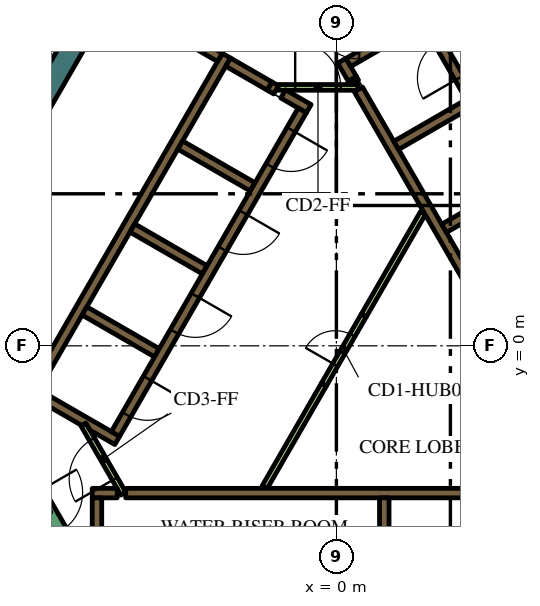
"""IFC4 building model, lengths in metres.
Left out: names, types, materials, properties, quantities, classifications, styles, units other than length and angle.
Written with IfcOpenShell. Run it as: python <this file> out.ifc"""

import sys

from ifc_helpers import new_model, si_unit, direction, frame, frame_2d, origin, place, context, subcontext, project, spatial, polyline, rectangle, outline, extrude, element, fill, save


model = new_model("IFC4")
c1 = context("Model", 3, precision=1e-05, world=origin(), true_north=direction((0.0, 1.0)))
c2 = subcontext(c1, "Body", "Model", "MODEL_VIEW")
j1 = project(units=[si_unit("LENGTHUNIT", "METRE"), si_unit("PLANEANGLEUNIT", "RADIAN")], contexts=[c1])
p1 = place(None, origin())
s1 = spatial("IfcSite", under=j1, at=p1, CompositionType="ELEMENT")
p2 = place(p1, origin())
s2 = spatial("IfcBuilding", under=s1, at=p2, CompositionType="ELEMENT")
p3 = place(p2, frame((0.0, 0.0, 317.4)))
s3 = spatial("IfcBuildingStorey", under=s2, at=p3, CompositionType="ELEMENT", Elevation=317.4)
p4 = place(p3, frame((1.989, 16.456, 0.0), z_axis=(0.0, 0.0, 1.0), x_axis=(0.49999102663, -0.8660305845, 0.0)))
e1 = element("IfcWall", 1, at=p4, inside=s3, PredefinedType="SOLIDWALL", context=c2, shape_type="SweptSolid", body=[
    extrude(rectangle(XDim=12.406, YDim=0.6, at=frame_2d((6.203, 0.0))), origin(), (0.0, 0.0, 1.0), 4.2),
])
p5 = place(p3, frame((-12.582, -1.892, 0.0), z_axis=(0.0, 0.0, 1.0), x_axis=(0.500003640647, 0.866023301845, 0.0)))
e2 = element("IfcWall", 2, at=p5, inside=s3, PredefinedType="SOLIDWALL", context=c2, shape_type="SweptSolid", body=[
    extrude(rectangle(XDim=15.858, YDim=0.6, at=frame_2d((7.929, 0.0))), origin(), (0.0, 0.0, 1.0), 4.2),
])
p6 = place(p3, frame((-5.545, -3.875, 0.0), z_axis=(0.0, 0.0, 1.0), x_axis=(1.0, 0.0, 0.0)))
e3 = element("IfcWall", 3, at=p6, inside=s3, PredefinedType="SOLIDWALL", context=c2, shape_type="SweptSolid", body=[
    extrude(rectangle(XDim=11.97, YDim=0.25, at=frame_2d((5.985, 0.0))), origin(), (0.0, 0.0, 1.0), 4.2),
])
p7 = place(p3, frame((-6.425, -3.875, 0.0), z_axis=(0.0, 0.0, 1.0), x_axis=(1.0, 0.0, 0.0)))
e4 = element("IfcWall", 4, at=p7, inside=s3, PredefinedType="SOLIDWALL", context=c2, shape_type="SweptSolid", body=[
    extrude(rectangle(XDim=0.658, YDim=0.25, at=frame_2d((0.329, 0.0))), origin(), (0.0, 0.0, 1.0), 4.2),
])
p8 = place(p3, frame((1.26, -4.0, 0.0), z_axis=(0.0, 0.0, 1.0), x_axis=(0.0, -1.0, 0.0)))
e5 = element("IfcWall", 5, at=p8, inside=s3, PredefinedType="SOLIDWALL", context=c2, shape_type="SweptSolid", body=[
    extrude(rectangle(XDim=2.2, YDim=0.25, at=frame_2d((1.1, 0.0))), origin(), (0.0, 0.0, 1.0), 4.2),
])
p9 = place(p3, frame((-6.3, -7.125, 0.0), z_axis=(0.0, 0.0, 1.0), x_axis=(0.0, 1.0, 0.0)))
e6 = element("IfcWall", 6, at=p9, inside=s3, PredefinedType="SOLIDWALL", context=c2, shape_type="SweptSolid", body=[
    extrude(rectangle(XDim=3.125, YDim=0.25, at=frame_2d((1.562, 0.0))), origin(), (0.0, 0.0, 1.0), 4.2),
])
p10 = place(p3, frame((0.473, 6.93, 0.0), z_axis=(0.0, 0.0, 1.0), x_axis=(-0.49972245349, 0.866185586049, 0.0)))
e7 = element("IfcWall", 7, at=p10, inside=s3, PredefinedType="SOLIDWALL", context=c2, shape_type="SweptSolid", body=[
    extrude(rectangle(XDim=0.11, YDim=0.25, at=frame_2d((0.055, 0.0))), origin(), (0.0, 0.0, 1.0), 4.2),
])
p11 = place(p3, frame((6.568, -3.627, 0.0), z_axis=(0.0, 0.0, 1.0), x_axis=(-0.499999455981, 0.866025717874, 0.0)))
e8 = element("IfcWall", 8, at=p11, inside=s3, PredefinedType="SOLIDWALL", context=c2, shape_type="SweptSolid", body=[
    extrude(rectangle(XDim=11.978, YDim=0.25, at=frame_2d((5.989, 0.0))), origin(), (0.0, 0.0, 1.0), 4.2),
])
p12 = place(p3, frame((0.417, 7.027, 0.0), z_axis=(0.0, 0.0, 1.0), x_axis=(-0.500210807569, 0.865903659763, 0.0)))
e9 = element("IfcWall", 9, at=p12, inside=s3, PredefinedType="SOLIDWALL", context=c2, shape_type="SweptSolid", body=[
    extrude(rectangle(XDim=0.548, YDim=0.25, at=frame_2d((0.274, 0.0))), origin(), (0.0, 0.0, 1.0), 4.2),
])
p13 = place(p3, frame((3.1, 9.064, 0.0), z_axis=(0.0, 0.0, 1.0), x_axis=(-0.866030133475, -0.499991807846, 0.0)))
e10 = element("IfcWall", 10, at=p13, inside=s3, PredefinedType="SOLIDWALL", context=c2, shape_type="SweptSolid", body=[
    extrude(rectangle(XDim=3.217, YDim=0.25, at=frame_2d((1.608, 0.0))), origin(), (0.0, 0.0, 1.0), 4.2),
])
p14 = place(p3, frame((1.574, 5.274, 0.0), z_axis=(0.0, 0.0, 1.0), x_axis=(0.866028486751, 0.499994660107, 0.0)))
e11 = element("IfcWall", 11, at=p14, inside=s3, PredefinedType="SOLIDWALL", context=c2, shape_type="SweptSolid", body=[
    extrude(rectangle(XDim=2.2, YDim=0.25, at=frame_2d((1.1, 0.0))), origin(), (0.0, 0.0, 1.0), 4.2),
])
p15 = place(p3, frame((2.834, 3.091, 0.0), z_axis=(0.0, 0.0, 1.0), x_axis=(0.866008176907, 0.50002983664, 0.0)))
e12 = element("IfcWall", 12, at=p15, inside=s3, PredefinedType="SOLIDWALL", context=c2, shape_type="SweptSolid", body=[
    extrude(rectangle(XDim=2.2, YDim=0.25, at=frame_2d((1.1, 0.0))), origin(), (0.0, 0.0, 1.0), 4.2),
])
p16 = place(p3, frame((-8.06, -1.311, 0.0), z_axis=(0.0, 0.0, 1.0), x_axis=(0.50000273126, 0.866023826885, 0.0)))
e13 = element("IfcWall", 13, at=p16, inside=s3, PredefinedType="SOLIDWALL", context=c2, shape_type="SweptSolid", body=[
    extrude(rectangle(XDim=10.33, YDim=0.25, at=frame_2d((5.165, 0.0))), origin(), (0.0, 0.0, 1.0), 4.2),
])
p17 = place(p3, frame((-1.758, 6.835, 0.0), z_axis=(0.0, 0.0, 1.0), x_axis=(0.865982457891, -0.500074377092, 0.0)))
e14 = element("IfcWall", 14, at=p17, inside=s3, PredefinedType="SOLIDWALL", context=c2, shape_type="SweptSolid", body=[
    extrude(rectangle(XDim=0.2, YDim=0.25, at=frame_2d((0.1, 0.0))), origin(), (0.0, 0.0, 1.0), 4.2),
])
p18 = place(p3, frame((-1.76, 6.836, 0.0), z_axis=(0.0, 0.0, 1.0), x_axis=(-0.865952863304, 0.500125622755, 0.0)))
e15 = element("IfcWall", 15, at=p18, inside=s3, PredefinedType="SOLIDWALL", context=c2, shape_type="SweptSolid", body=[
    extrude(rectangle(XDim=1.258, YDim=0.25, at=frame_2d((0.629, 0.0))), origin(), (0.0, 0.0, 1.0), 4.2),
])
p19 = place(p3, frame((-0.728, 6.24, 0.0), z_axis=(0.0, 0.0, 1.0), x_axis=(-0.865955664968, 0.500120771724, 0.0)))
e16 = element("IfcWall", 16, at=p19, inside=s3, PredefinedType="SOLIDWALL", context=c2, shape_type="SweptSolid", body=[
    extrude(rectangle(XDim=0.778, YDim=0.25, at=frame_2d((0.389, 0.0))), origin(), (0.0, 0.0, 1.0), 4.2),
])
for number, where, z_axis, x_axis in (
    (17, (-2.204, 4.182, 0.0), (0.0, 0.0, 1.0), (-0.866, 0.5, 0.0)),
    (18, (-5.369, 3.1, 0.0), (0.0, 0.0, 1.0), (0.866, -0.5, 0.0)),
    (19, (-4.724, -0.182, 0.0), (0.0, 0.0, 1.0), (-0.866, 0.5, 0.0)),
):
    element("IfcWall", number, at=place(p3, frame(where, z_axis=z_axis, x_axis=x_axis)), inside=s3, PredefinedType="SOLIDWALL", context=c2, shape_type="SweptSolid", body=[
        extrude(rectangle(XDim=2.2, YDim=0.25, at=frame_2d((1.1, 0.0))), origin(), (0.0, 0.0, 1.0), 4.2),
    ])
p20 = place(p3, origin())
e20 = element("IfcWall", 20, at=p20, inside=s3, PredefinedType="SOLIDWALL", context=c2, shape_type="SweptSolid", body=[
    extrude(outline(polyline([(-5.922, -2.257), (-5.922, -2.257), (-5.705, -2.382), (-5.83, -2.598), (-6.483, -2.221), (-6.591, -2.033), (-6.591, -2.033), (-6.7, -2.096), (-7.952, -1.373), (-7.827, -1.156), (-5.922, -2.257)])), origin(), (0.0, 0.0, 1.0), 4.2),
])
p21 = place(p3, frame((-3.066, 7.59, 0.0), z_axis=(0.0, 0.0, 1.0), x_axis=(-0.866081358704, 0.49990307071, 0.0)))
e21 = element("IfcWall", 21, at=p21, inside=s3, PredefinedType="SOLIDWALL", context=c2, shape_type="SweptSolid", body=[
    extrude(rectangle(XDim=0.858, YDim=0.25, at=frame_2d((0.429, 0.0))), origin(), (0.0, 0.0, 1.0), 4.2),
])
p22 = place(p3, frame((-1.887, -3.718, 0.0), z_axis=(0.0, 0.0, 1.0), x_axis=(0.500043732237, 0.866000153493, 0.0)))
e22 = element("IfcWall", 22, at=p22, inside=s3, PredefinedType="PARTITIONING", context=c2, shape_type="SweptSolid", body=[
    extrude(rectangle(XDim=3.114, YDim=0.15, at=frame_2d((1.557, 0.0))), origin(), (0.0, 0.0, 1.0), 3.5),
])
p23 = place(p3, frame((0.72, 0.797, 0.0), z_axis=(0.0, 0.0, 1.0), x_axis=(0.499984921984, 0.866034108906, 0.0)))
e23 = element("IfcWall", 23, at=p23, inside=s3, PredefinedType="PARTITIONING", context=c2, shape_type="SweptSolid", body=[
    extrude(rectangle(XDim=3.113, YDim=0.15, at=frame_2d((1.557, 0.0))), origin(), (0.0, 0.0, 1.0), 3.5),
])
p24 = place(p3, frame((8.565, -2.185, 0.0), z_axis=(0.0, 0.0, 1.0), x_axis=(-0.499997954832, 0.866026584559, 0.0)))
e24 = element("IfcWall", 24, at=p24, inside=s3, PredefinedType="SOLIDWALL", context=c2, shape_type="SweptSolid", body=[
    extrude(rectangle(XDim=12.35, YDim=0.25, at=frame_2d((6.175, 0.0))), origin(), (0.0, 0.0, 1.0), 4.2),
])
p25 = place(p24, frame((0.685, 0.0, 0.0)))
e25 = element("IfcOpeningElement", 25, at=p25, cuts=e24, PredefinedType="OPENING", context=c2, shape_type="SweptSolid", body=[
    extrude(rectangle(XDim=0.9, YDim=2.1, at=frame_2d((0.45, 1.05))), frame((0.0, 0.135, 0.0), z_axis=(0.0, -1.0, 0.0), x_axis=(1.0, 0.0, 0.0)), (0.0, 0.0, 1.0), 0.27),
])
p26 = place(p24, frame((3.105, 0.0, 0.0)))
e26 = element("IfcOpeningElement", 26, at=p26, cuts=e24, PredefinedType="OPENING", context=c2, shape_type="SweptSolid", body=[
    extrude(rectangle(XDim=1.1, YDim=2.1, at=frame_2d((0.55, 1.05))), frame((0.0, 0.135, 0.0), z_axis=(0.0, -1.0, 0.0), x_axis=(1.0, 0.0, 0.0)), (0.0, 0.0, 1.0), 0.27),
])
p27 = place(p24, frame((5.625, 0.0, 0.0)))
e27 = element("IfcOpeningElement", 27, at=p27, cuts=e24, PredefinedType="OPENING", context=c2, shape_type="SweptSolid", body=[
    extrude(rectangle(XDim=1.1, YDim=2.1, at=frame_2d((0.55, 1.05))), frame((0.0, 0.135, 0.0), z_axis=(0.0, -1.0, 0.0), x_axis=(1.0, 0.0, 0.0)), (0.0, 0.0, 1.0), 0.27),
])
p28 = place(p24, frame((8.145, 0.0, 0.0)))
e28 = element("IfcOpeningElement", 28, at=p28, cuts=e24, PredefinedType="OPENING", context=c2, shape_type="SweptSolid", body=[
    extrude(rectangle(XDim=1.1, YDim=2.1, at=frame_2d((0.55, 1.05))), frame((0.0, 0.135, 0.0), z_axis=(0.0, -1.0, 0.0), x_axis=(1.0, 0.0, 0.0)), (0.0, 0.0, 1.0), 0.27),
])
p29 = place(p24, frame((10.665, 0.0, 0.0)))
e29 = element("IfcOpeningElement", 29, at=p29, cuts=e24, PredefinedType="OPENING", context=c2, shape_type="SweptSolid", body=[
    extrude(rectangle(XDim=1.1, YDim=2.1, at=frame_2d((0.55, 1.05))), frame((0.0, 0.135, 0.0), z_axis=(0.0, -1.0, 0.0), x_axis=(1.0, 0.0, 0.0)), (0.0, 0.0, 1.0), 0.27),
])
p30 = place(p3, frame((-0.898, 6.194, 0.0), z_axis=(0.0, 0.0, 1.0), x_axis=(-0.499996202215, -0.866027596426, 0.0)))
e30 = element("IfcWall", 30, at=p30, inside=s3, PredefinedType="SOLIDWALL", context=c2, shape_type="SweptSolid", body=[
    extrude(rectangle(XDim=9.83, YDim=0.25, at=frame_2d((4.915, 0.0))), origin(), (0.0, 0.0, 1.0), 4.2),
])
p31 = place(p30, frame((0.585, 0.0, 0.0)))
e31 = element("IfcOpeningElement", 31, at=p31, cuts=e30, PredefinedType="OPENING", context=c2, shape_type="SweptSolid", body=[
    extrude(rectangle(XDim=1.1, YDim=2.1, at=frame_2d((0.55, 1.05))), frame((0.0, 0.135, 0.0), z_axis=(0.0, -1.0, 0.0), x_axis=(1.0, 0.0, 0.0)), (0.0, 0.0, 1.0), 0.27),
])
p32 = place(p30, frame((3.105, 0.0, 0.0)))
e32 = element("IfcOpeningElement", 32, at=p32, cuts=e30, PredefinedType="OPENING", context=c2, shape_type="SweptSolid", body=[
    extrude(rectangle(XDim=1.1, YDim=2.1, at=frame_2d((0.55, 1.05))), frame((0.0, 0.135, 0.0), z_axis=(0.0, -1.0, 0.0), x_axis=(1.0, 0.0, 0.0)), (0.0, 0.0, 1.0), 0.27),
])
p33 = place(p30, frame((5.625, 0.0, 0.0)))
e33 = element("IfcOpeningElement", 33, at=p33, cuts=e30, PredefinedType="OPENING", context=c2, shape_type="SweptSolid", body=[
    extrude(rectangle(XDim=1.1, YDim=2.1, at=frame_2d((0.55, 1.05))), frame((0.0, 0.135, 0.0), z_axis=(0.0, -1.0, 0.0), x_axis=(1.0, 0.0, 0.0)), (0.0, 0.0, 1.0), 0.27),
])
p34 = place(p30, frame((8.145, 0.0, 0.0)))
e34 = element("IfcOpeningElement", 34, at=p34, cuts=e30, PredefinedType="OPENING", context=c2, shape_type="SweptSolid", body=[
    extrude(rectangle(XDim=1.1, YDim=2.1, at=frame_2d((0.55, 1.05))), frame((0.0, 0.135, 0.0), z_axis=(0.0, -1.0, 0.0), x_axis=(1.0, 0.0, 0.0)), (0.0, 0.0, 1.0), 0.27),
])
p35 = place(p3, frame((-8.103, -3.466, 0.0), z_axis=(0.0, 0.0, 1.0), x_axis=(0.500078061341, -0.865980330357, 0.0)))
e35 = element("IfcWall", 35, at=p35, inside=s3, PredefinedType="SOLIDWALL", context=c2, shape_type="SweptSolid", body=[
    extrude(rectangle(XDim=2.1, YDim=0.4, at=frame_2d((1.05, 0.0))), origin(), (0.0, 0.0, 1.0), 4.2),
])
p36 = place(p35, frame((0.45, 0.0, 0.0)))
e36 = element("IfcOpeningElement", 36, at=p36, cuts=e35, PredefinedType="OPENING", context=c2, shape_type="SweptSolid", body=[
    extrude(rectangle(XDim=1.2, YDim=2.1, at=frame_2d((0.6, 1.05))), frame((0.0, 0.21, 0.0), z_axis=(0.0, -1.0, 0.0), x_axis=(1.0, 0.0, 0.0)), (0.0, 0.0, 1.0), 0.42),
])
p37 = place(p3, frame((-0.33, -1.022, 0.0), z_axis=(0.0, 0.0, 1.0), x_axis=(0.500027713859, 0.866009402589, 0.0)))
e37 = element("IfcWall", 37, at=p37, inside=s3, PredefinedType="PARTITIONING", context=c2, shape_type="SweptSolid", body=[
    extrude(rectangle(XDim=2.1, YDim=0.15, at=frame_2d((1.05, 0.0))), origin(), (0.0, 0.0, 1.0), 3.5),
])
p38 = place(p37, frame((0.6, 0.0, 0.0)))
e38 = element("IfcOpeningElement", 38, at=p38, cuts=e37, PredefinedType="OPENING", context=c2, shape_type="SweptSolid", body=[
    extrude(rectangle(XDim=0.9, YDim=2.1, at=frame_2d((0.45, 1.05))), frame((0.0, 0.085, 0.0), z_axis=(0.0, -1.0, 0.0), x_axis=(1.0, 0.0, 0.0)), (0.0, 0.0, 1.0), 0.17),
])
p39 = place(p3, frame((-1.534, 6.8, 0.0), z_axis=(0.0, 0.0, 1.0), x_axis=(1.0, 0.0, 0.0)))
e39 = element("IfcWall", 39, at=p39, inside=s3, PredefinedType="PARTITIONING", context=c2, shape_type="SweptSolid", body=[
    extrude(rectangle(XDim=2.1, YDim=0.15, at=frame_2d((1.05, 0.0))), origin(), (0.0, 0.0, 1.0), 3.5),
])
p40 = place(p39, frame((0.45, 0.0, 0.0)))
e40 = element("IfcOpeningElement", 40, at=p40, cuts=e39, PredefinedType="OPENING", context=c2, shape_type="SweptSolid", body=[
    extrude(rectangle(XDim=1.2, YDim=2.1, at=frame_2d((0.6, 1.05))), frame((0.0, 0.085, 0.0), z_axis=(0.0, -1.0, 0.0), x_axis=(1.0, 0.0, 0.0)), (0.0, 0.0, 1.0), 0.17),
])
p41 = place(p3, frame((-5.606, -3.89, 0.0), z_axis=(0.0, 0.0, 1.0), x_axis=(-0.500027713859, 0.866009402589, 0.0)))
e41 = element("IfcWall", 41, at=p41, inside=s3, PredefinedType="PARTITIONING", context=c2, shape_type="SweptSolid", body=[
    extrude(rectangle(XDim=2.1, YDim=0.15, at=frame_2d((1.05, 0.0))), origin(), (0.0, 0.0, 1.0), 3.5),
])
p42 = place(p41, frame((0.45, 0.0, 0.0)))
e42 = element("IfcOpeningElement", 42, at=p42, cuts=e41, PredefinedType="OPENING", context=c2, shape_type="SweptSolid", body=[
    extrude(rectangle(XDim=1.2, YDim=2.1, at=frame_2d((0.6, 1.05))), frame((0.0, 0.085, 0.0), z_axis=(0.0, -1.0, 0.0), x_axis=(1.0, 0.0, 0.0)), (0.0, 0.0, 1.0), 0.17),
])
p43 = place(p29, origin())
e43 = element("IfcDoor", 43, at=p43, inside=s3, OperationType="DOUBLE_DOOR_SLIDING", PredefinedType="DOOR", context=c2, shape_type="SweptSolid", body=[
    extrude(rectangle(XDim=1.1, YDim=2.1, at=frame_2d((0.55, 1.05))), frame((0.0, 0.025, 0.0), z_axis=(0.0, -1.0, 0.0), x_axis=(1.0, 0.0, 0.0)), (0.0, 0.0, 1.0), 0.05),
])
fill(e29, e43)
p44 = place(p31, origin())
e44 = element("IfcDoor", 44, at=p44, inside=s3, OperationType="DOUBLE_DOOR_SLIDING", PredefinedType="DOOR", context=c2, shape_type="SweptSolid", body=[
    extrude(rectangle(XDim=1.1, YDim=2.1, at=frame_2d((0.55, 1.05))), frame((0.0, 0.025, 0.0), z_axis=(0.0, -1.0, 0.0), x_axis=(1.0, 0.0, 0.0)), (0.0, 0.0, 1.0), 0.05),
])
fill(e31, e44)
p45 = place(p32, origin())
e45 = element("IfcDoor", 45, at=p45, inside=s3, OperationType="DOUBLE_DOOR_SLIDING", PredefinedType="DOOR", context=c2, shape_type="SweptSolid", body=[
    extrude(rectangle(XDim=1.1, YDim=2.1, at=frame_2d((0.55, 1.05))), frame((0.0, 0.025, 0.0), z_axis=(0.0, -1.0, 0.0), x_axis=(1.0, 0.0, 0.0)), (0.0, 0.0, 1.0), 0.05),
])
fill(e32, e45)
p46 = place(p33, origin())
e46 = element("IfcDoor", 46, at=p46, inside=s3, OperationType="DOUBLE_DOOR_SLIDING", PredefinedType="DOOR", context=c2, shape_type="SweptSolid", body=[
    extrude(rectangle(XDim=1.1, YDim=2.1, at=frame_2d((0.55, 1.05))), frame((0.0, 0.025, 0.0), z_axis=(0.0, -1.0, 0.0), x_axis=(1.0, 0.0, 0.0)), (0.0, 0.0, 1.0), 0.05),
])
fill(e33, e46)
p47 = place(p34, origin())
e47 = element("IfcDoor", 47, at=p47, inside=s3, OperationType="DOUBLE_DOOR_SLIDING", PredefinedType="DOOR", context=c2, shape_type="SweptSolid", body=[
    extrude(rectangle(XDim=1.1, YDim=2.1, at=frame_2d((0.55, 1.05))), frame((0.0, 0.025, 0.0), z_axis=(0.0, -1.0, 0.0), x_axis=(1.0, 0.0, 0.0)), (0.0, 0.0, 1.0), 0.05),
])
fill(e34, e47)
p48 = place(p36, origin())
e48 = element("IfcDoor", 48, at=p48, inside=s3, OperationType="SINGLE_SWING_LEFT", PredefinedType="DOOR", context=c2, shape_type="SweptSolid", body=[
    extrude(rectangle(XDim=1.2, YDim=2.1, at=frame_2d((0.6, 1.05))), frame((0.0, 0.025, 0.0), z_axis=(0.0, -1.0, 0.0), x_axis=(1.0, 0.0, 0.0)), (0.0, 0.0, 1.0), 0.05),
])
fill(e36, e48)
p49 = place(p38, origin())
e49 = element("IfcDoor", 49, at=p49, inside=s3, OperationType="SINGLE_SWING_LEFT", PredefinedType="DOOR", context=c2, shape_type="SweptSolid", body=[
    extrude(rectangle(XDim=0.9, YDim=2.1, at=frame_2d((0.45, 1.05))), frame((0.0, 0.025, 0.0), z_axis=(0.0, -1.0, 0.0), x_axis=(1.0, 0.0, 0.0)), (0.0, 0.0, 1.0), 0.05),
])
fill(e38, e49)
p50 = place(p40, origin())
e50 = element("IfcDoor", 50, at=p50, inside=s3, OperationType="SINGLE_SWING_LEFT", PredefinedType="DOOR", context=c2, shape_type="SweptSolid", body=[
    extrude(rectangle(XDim=1.2, YDim=2.1, at=frame_2d((0.6, 1.05))), frame((0.0, 0.025, 0.0), z_axis=(0.0, -1.0, 0.0), x_axis=(1.0, 0.0, 0.0)), (0.0, 0.0, 1.0), 0.05),
])
fill(e40, e50)
p51 = place(p42, origin())
e51 = element("IfcDoor", 51, at=p51, inside=s3, OperationType="SINGLE_SWING_LEFT", PredefinedType="DOOR", context=c2, shape_type="SweptSolid", body=[
    extrude(rectangle(XDim=1.2, YDim=2.1, at=frame_2d((0.6, 1.05))), frame((0.0, 0.025, 0.0), z_axis=(0.0, -1.0, 0.0), x_axis=(1.0, 0.0, 0.0)), (0.0, 0.0, 1.0), 0.05),
])
fill(e42, e51)
save(model, sys.argv[1])
